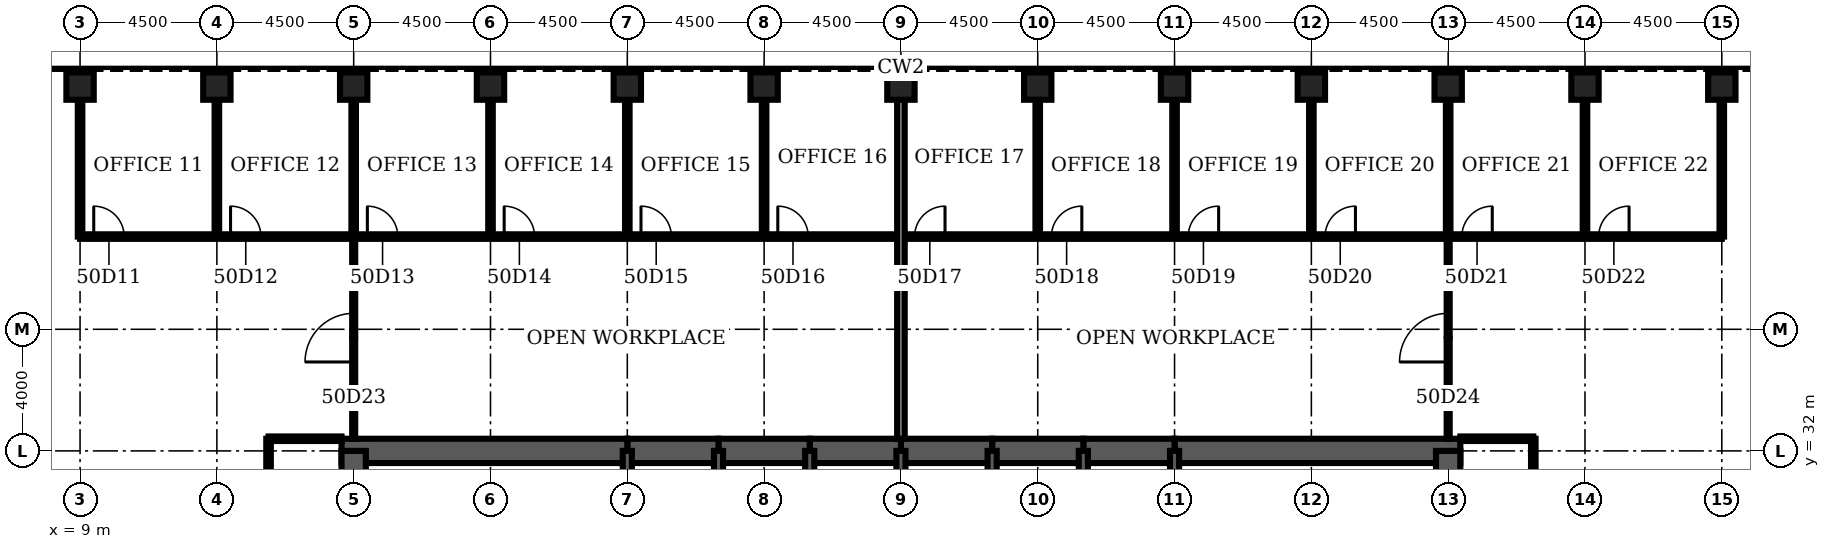
"""IFC4 building model, lengths in metres.
Left out: names, types, materials, properties, quantities, classifications, styles, units other than length and angle.
Written with IfcOpenShell. Run it as: python <this file> out.ifc"""

import sys

from ifc_helpers import new_model, si_unit, direction, frame, frame_2d, origin, origin_2d, place, context, subcontext, project, spatial, rectangle, hollow_rectangle, extrude, element, fill, save


model = new_model("IFC4")
c1 = context("Model", 3, precision=1e-05, world=origin(), true_north=direction((0.0, 1.0)))
c2 = subcontext(c1, "Body", "Model", "MODEL_VIEW")
j1 = project(units=[si_unit("LENGTHUNIT", "METRE"), si_unit("PLANEANGLEUNIT", "RADIAN")], contexts=[c1])
p1 = place(None, origin())
s1 = spatial("IfcSite", under=j1, at=p1, CompositionType="ELEMENT")
p2 = place(p1, origin())
s2 = spatial("IfcBuilding", under=s1, at=p2, CompositionType="ELEMENT")
p3 = place(p2, frame((0.0, 0.0, 223.6)))
s3 = spatial("IfcBuildingStorey", under=s2, at=p3, CompositionType="ELEMENT", Elevation=223.6)
for number, where, z_axis, x_axis in (
    (1, (63.0, 44.0, 0.0), (0.0, 0.0, 1.0), (0.0, 1.0, 0.0)),
    (2, (58.5, 44.0, 0.0), (0.0, 0.0, 1.0), (0.0, 1.0, 0.0)),
    (3, (54.0, 44.0, 0.0), (0.0, 0.0, 1.0), (0.0, 1.0, 0.0)),
    (4, (49.5, 44.0, 0.0), (0.0, 0.0, 1.0), (0.0, 1.0, 0.0)),
    (5, (45.0, 44.0, 0.0), (0.0, 0.0, 1.0), (0.0, 1.0, 0.0)),
    (6, (40.5, 44.0, 0.0), (0.0, 0.0, 1.0), (0.0, 1.0, 0.0)),
    (7, (36.0, 44.0, 0.0), (0.0, 0.0, 1.0), (0.0, 1.0, 0.0)),
    (8, (31.5, 44.0, 0.0), (0.0, 0.0, 1.0), (0.0, 1.0, 0.0)),
    (9, (27.0, 44.0, 0.0), (0.0, 0.0, 1.0), (0.0, 1.0, 0.0)),
    (10, (22.5, 44.0, 0.0), (0.0, 0.0, 1.0), (0.0, 1.0, 0.0)),
    (11, (18.0, 44.0, 0.0), (0.0, 0.0, 1.0), (0.0, 1.0, 0.0)),
    (12, (13.5, 44.0, 0.0), (0.0, 0.0, 1.0), (0.0, 1.0, 0.0)),
    (13, (9.0, 44.0, 0.0), (0.0, 0.0, 1.0), (0.0, 1.0, 0.0)),
):
    element("IfcColumn", number, at=place(p3, frame(where, z_axis=z_axis, x_axis=x_axis)), inside=s3, PredefinedType="COLUMN", context=c2, shape_type="SweptSolid", body=[
        extrude(hollow_rectangle(XDim=0.9, YDim=0.9, WallThickness=0.08, at=origin_2d()), origin(), (0.0, 0.0, 1.0), 4.2),
    ])
p4 = place(p3, frame((54.4, 32.0, 0.0), z_axis=(0.0, 0.0, 1.0), x_axis=(-1.0, 0.0, 0.0)))
e14 = element("IfcWall", 14, at=p4, inside=s3, PredefinedType="SHEAR", context=c2, shape_type="SweptSolid", body=[
    extrude(rectangle(XDim=9.4, YDim=0.8, at=frame_2d((4.7, 0.0))), origin(), (0.0, 0.0, 1.0), 4.2),
])
for number, where, z_axis, x_axis in (
    (15, (45.0, 32.0, 0.0), (0.0, 0.0, 1.0), (-1.0, 0.0, 0.0)),
    (16, (42.0, 32.0, 0.0), (0.0, 0.0, 1.0), (-1.0, 0.0, 0.0)),
    (17, (39.0, 32.0, 0.0), (0.0, 0.0, 1.0), (-1.0, 0.0, 0.0)),
    (18, (36.0, 32.0, 0.0), (0.0, 0.0, 1.0), (-1.0, 0.0, 0.0)),
    (19, (33.0, 32.0, 0.0), (0.0, 0.0, 1.0), (-1.0, 0.0, 0.0)),
    (20, (30.0, 32.0, 0.0), (0.0, 0.0, 1.0), (-1.0, 0.0, 0.0)),
):
    element("IfcWall", number, at=place(p3, frame(where, z_axis=z_axis, x_axis=x_axis)), inside=s3, PredefinedType="SHEAR", context=c2, shape_type="SweptSolid", body=[
        extrude(rectangle(XDim=3.0, YDim=0.8, at=frame_2d((1.5, 0.0))), origin(), (0.0, 0.0, 1.0), 4.2),
    ])
p5 = place(p3, frame((27.0, 32.0, 0.0), z_axis=(0.0, 0.0, 1.0), x_axis=(-1.0, 0.0, 0.0)))
e21 = element("IfcWall", 21, at=p5, inside=s3, PredefinedType="SHEAR", context=c2, shape_type="SweptSolid", body=[
    extrude(rectangle(XDim=9.4, YDim=0.8, at=frame_2d((4.7, 0.0))), origin(), (0.0, 0.0, 1.0), 4.2),
])
for number, where, z_axis, x_axis in (
    (22, (18.0, 32.0, 0.0), (0.0, 0.0, 1.0), (0.0, -1.0, 0.0)),
    (23, (54.0, 28.8, 0.0), (0.0, 0.0, 1.0), (0.0, 1.0, 0.0)),
):
    element("IfcWall", number, at=place(p3, frame(where, z_axis=z_axis, x_axis=x_axis)), inside=s3, PredefinedType="SHEAR", context=c2, shape_type="SweptSolid", body=[
        extrude(rectangle(XDim=3.2, YDim=0.8, at=frame_2d((1.6, 0.0))), origin(), (0.0, 0.0, 1.0), 4.2),
    ])
for number, where, z_axis, x_axis in (
    (24, (27.0, 28.8, 0.0), (0.0, 0.0, 1.0), (0.0, 1.0, 0.0)),
    (25, (30.0, 28.8, 0.0), (0.0, 0.0, 1.0), (0.0, 1.0, 0.0)),
    (26, (33.0, 28.8, 0.0), (0.0, 0.0, 1.0), (0.0, 1.0, 0.0)),
    (27, (36.0, 28.8, 0.0), (0.0, 0.0, 1.0), (0.0, 1.0, 0.0)),
    (28, (39.0, 28.8, 0.0), (0.0, 0.0, 1.0), (0.0, 1.0, 0.0)),
    (29, (42.0, 28.8, 0.0), (0.0, 0.0, 1.0), (0.0, 1.0, 0.0)),
    (30, (45.0, 28.8, 0.0), (0.0, 0.0, 1.0), (0.0, 1.0, 0.0)),
):
    element("IfcWall", number, at=place(p3, frame(where, z_axis=z_axis, x_axis=x_axis)), inside=s3, PredefinedType="SOLIDWALL", context=c2, shape_type="SweptSolid", body=[
        extrude(rectangle(XDim=3.2, YDim=0.3, at=frame_2d((1.6, 0.0))), origin(), (0.0, 0.0, 1.0), 4.2),
    ])
for number, where, z_axis, x_axis in (
    (31, (15.2, 32.4, 0.0), (0.0, 0.0, 1.0), (1.0, 0.0, 0.0)),
    (32, (54.4, 32.4, 0.0), (0.0, 0.0, 1.0), (1.0, 0.0, 0.0)),
):
    element("IfcWall", number, at=place(p3, frame(where, z_axis=z_axis, x_axis=x_axis)), inside=s3, PredefinedType="PARTITIONING", context=c2, shape_type="SweptSolid", body=[
        extrude(rectangle(XDim=2.4, YDim=0.15, at=frame_2d((1.2, 0.0))), origin(), (0.0, 0.0, 1.0), 3.0),
    ])
p6 = place(p3, frame((9.0, 39.05, 0.0), z_axis=(0.0, 0.0, 1.0), x_axis=(1.0, 0.0, 0.0)))
e33 = element("IfcWall", 33, at=p6, inside=s3, PredefinedType="PARTITIONING", context=c2, shape_type="SweptSolid", body=[
    extrude(rectangle(XDim=54.0, YDim=0.15, at=frame_2d((27.0, 0.0))), origin(), (0.0, 0.0, 1.0), 3.0),
])
p7 = place(p6, frame((0.45, 0.0, 0.0)))
e34 = element("IfcOpeningElement", 34, at=p7, cuts=e33, PredefinedType="OPENING", context=c2, shape_type="SweptSolid", body=[
    extrude(rectangle(XDim=1.0, YDim=2.1, at=frame_2d((0.5, 1.05))), frame((0.0, 0.085, 0.0), z_axis=(0.0, -1.0, 0.0), x_axis=(1.0, 0.0, 0.0)), (0.0, 0.0, 1.0), 0.17),
])
p8 = place(p6, frame((4.95, 0.0, 0.0)))
e35 = element("IfcOpeningElement", 35, at=p8, cuts=e33, PredefinedType="OPENING", context=c2, shape_type="SweptSolid", body=[
    extrude(rectangle(XDim=1.0, YDim=2.1, at=frame_2d((0.5, 1.05))), frame((0.0, 0.085, 0.0), z_axis=(0.0, -1.0, 0.0), x_axis=(1.0, 0.0, 0.0)), (0.0, 0.0, 1.0), 0.17),
])
p9 = place(p6, frame((9.45, 0.0, 0.0)))
e36 = element("IfcOpeningElement", 36, at=p9, cuts=e33, PredefinedType="OPENING", context=c2, shape_type="SweptSolid", body=[
    extrude(rectangle(XDim=1.0, YDim=2.1, at=frame_2d((0.5, 1.05))), frame((0.0, 0.085, 0.0), z_axis=(0.0, -1.0, 0.0), x_axis=(1.0, 0.0, 0.0)), (0.0, 0.0, 1.0), 0.17),
])
p10 = place(p6, frame((13.95, 0.0, 0.0)))
e37 = element("IfcOpeningElement", 37, at=p10, cuts=e33, PredefinedType="OPENING", context=c2, shape_type="SweptSolid", body=[
    extrude(rectangle(XDim=1.0, YDim=2.1, at=frame_2d((0.5, 1.05))), frame((0.0, 0.085, 0.0), z_axis=(0.0, -1.0, 0.0), x_axis=(1.0, 0.0, 0.0)), (0.0, 0.0, 1.0), 0.17),
])
p11 = place(p6, frame((18.45, 0.0, 0.0)))
e38 = element("IfcOpeningElement", 38, at=p11, cuts=e33, PredefinedType="OPENING", context=c2, shape_type="SweptSolid", body=[
    extrude(rectangle(XDim=1.0, YDim=2.1, at=frame_2d((0.5, 1.05))), frame((0.0, 0.085, 0.0), z_axis=(0.0, -1.0, 0.0), x_axis=(1.0, 0.0, 0.0)), (0.0, 0.0, 1.0), 0.17),
])
p12 = place(p6, frame((22.95, 0.0, 0.0)))
e39 = element("IfcOpeningElement", 39, at=p12, cuts=e33, PredefinedType="OPENING", context=c2, shape_type="SweptSolid", body=[
    extrude(rectangle(XDim=1.0, YDim=2.1, at=frame_2d((0.5, 1.05))), frame((0.0, 0.085, 0.0), z_axis=(0.0, -1.0, 0.0), x_axis=(1.0, 0.0, 0.0)), (0.0, 0.0, 1.0), 0.17),
])
p13 = place(p6, frame((27.45, 0.0, 0.0)))
e40 = element("IfcOpeningElement", 40, at=p13, cuts=e33, PredefinedType="OPENING", context=c2, shape_type="SweptSolid", body=[
    extrude(rectangle(XDim=1.0, YDim=2.1, at=frame_2d((0.5, 1.05))), frame((0.0, 0.085, 0.0), z_axis=(0.0, -1.0, 0.0), x_axis=(1.0, 0.0, 0.0)), (0.0, 0.0, 1.0), 0.17),
])
p14 = place(p6, frame((31.95, 0.0, 0.0)))
e41 = element("IfcOpeningElement", 41, at=p14, cuts=e33, PredefinedType="OPENING", context=c2, shape_type="SweptSolid", body=[
    extrude(rectangle(XDim=1.0, YDim=2.1, at=frame_2d((0.5, 1.05))), frame((0.0, 0.085, 0.0), z_axis=(0.0, -1.0, 0.0), x_axis=(1.0, 0.0, 0.0)), (0.0, 0.0, 1.0), 0.17),
])
p15 = place(p6, frame((36.45, 0.0, 0.0)))
e42 = element("IfcOpeningElement", 42, at=p15, cuts=e33, PredefinedType="OPENING", context=c2, shape_type="SweptSolid", body=[
    extrude(rectangle(XDim=1.0, YDim=2.1, at=frame_2d((0.5, 1.05))), frame((0.0, 0.085, 0.0), z_axis=(0.0, -1.0, 0.0), x_axis=(1.0, 0.0, 0.0)), (0.0, 0.0, 1.0), 0.17),
])
p16 = place(p6, frame((40.95, 0.0, 0.0)))
e43 = element("IfcOpeningElement", 43, at=p16, cuts=e33, PredefinedType="OPENING", context=c2, shape_type="SweptSolid", body=[
    extrude(rectangle(XDim=1.0, YDim=2.1, at=frame_2d((0.5, 1.05))), frame((0.0, 0.085, 0.0), z_axis=(0.0, -1.0, 0.0), x_axis=(1.0, 0.0, 0.0)), (0.0, 0.0, 1.0), 0.17),
])
p17 = place(p6, frame((45.45, 0.0, 0.0)))
e44 = element("IfcOpeningElement", 44, at=p17, cuts=e33, PredefinedType="OPENING", context=c2, shape_type="SweptSolid", body=[
    extrude(rectangle(XDim=1.0, YDim=2.1, at=frame_2d((0.5, 1.05))), frame((0.0, 0.085, 0.0), z_axis=(0.0, -1.0, 0.0), x_axis=(1.0, 0.0, 0.0)), (0.0, 0.0, 1.0), 0.17),
])
p18 = place(p6, frame((49.95, 0.0, 0.0)))
e45 = element("IfcOpeningElement", 45, at=p18, cuts=e33, PredefinedType="OPENING", context=c2, shape_type="SweptSolid", body=[
    extrude(rectangle(XDim=1.0, YDim=2.1, at=frame_2d((0.5, 1.05))), frame((0.0, 0.085, 0.0), z_axis=(0.0, -1.0, 0.0), x_axis=(1.0, 0.0, 0.0)), (0.0, 0.0, 1.0), 0.17),
])
for number, where, z_axis, x_axis in (
    (46, (9.0, 39.05, 0.0), (0.0, 0.0, 1.0), (0.0, 1.0, 0.0)),
    (47, (13.5, 39.05, 0.0), (0.0, 0.0, 1.0), (0.0, 1.0, 0.0)),
):
    element("IfcWall", number, at=place(p3, frame(where, z_axis=z_axis, x_axis=x_axis)), inside=s3, PredefinedType="PARTITIONING", context=c2, shape_type="SweptSolid", body=[
        extrude(rectangle(XDim=4.5, YDim=0.15, at=frame_2d((2.25, 0.0))), origin(), (0.0, 0.0, 1.0), 3.0),
    ])
p19 = place(p3, frame((15.2, 13.8, 0.0), z_axis=(0.0, 0.0, 1.0), x_axis=(0.0, 1.0, 0.0)))
e48 = element("IfcWall", 48, at=p19, inside=s3, PredefinedType="PARTITIONING", context=c2, shape_type="SweptSolid", body=[
    extrude(rectangle(XDim=18.6, YDim=0.15, at=frame_2d((9.3, 0.0))), origin(), (0.0, 0.0, 1.0), 3.0),
])
p20 = place(p19, frame((9.6, 0.0, 0.0)))
e49 = element("IfcOpeningElement", 49, at=p20, cuts=e48, PredefinedType="OPENING", context=c2, shape_type="SweptSolid", body=[
    extrude(rectangle(XDim=1.2, YDim=2.1, at=frame_2d((0.6, 1.05))), frame((0.0, 0.085, 0.0), z_axis=(0.0, -1.0, 0.0), x_axis=(1.0, 0.0, 0.0)), (0.0, 0.0, 1.0), 0.17),
])
p21 = place(p3, frame((18.0, 32.4, 0.0), z_axis=(0.0, 0.0, 1.0), x_axis=(0.0, 1.0, 0.0)))
e50 = element("IfcWall", 50, at=p21, inside=s3, PredefinedType="PARTITIONING", context=c2, shape_type="SweptSolid", body=[
    extrude(rectangle(XDim=6.65, YDim=0.1, at=frame_2d((3.325, 0.0))), origin(), (0.0, 0.0, 1.0), 3.0),
])
p22 = place(p21, frame((2.525, 0.0, 0.0)))
e51 = element("IfcOpeningElement", 51, at=p22, cuts=e50, PredefinedType="OPENING", context=c2, shape_type="SweptSolid", body=[
    extrude(rectangle(XDim=1.6, YDim=2.1, at=frame_2d((0.8, 1.05))), frame((0.0, 0.06, 0.0), z_axis=(0.0, -1.0, 0.0), x_axis=(1.0, 0.0, 0.0)), (0.0, 0.0, 1.0), 0.12),
])
for number, where, z_axis, x_axis in (
    (52, (18.0, 39.05, 0.0), (0.0, 0.0, 1.0), (0.0, 1.0, 0.0)),
    (53, (22.5, 39.05, 0.0), (0.0, 0.0, 1.0), (0.0, 1.0, 0.0)),
    (54, (27.0, 39.05, 0.0), (0.0, 0.0, 1.0), (0.0, 1.0, 0.0)),
    (55, (31.5, 39.05, 0.0), (0.0, 0.0, 1.0), (0.0, 1.0, 0.0)),
):
    element("IfcWall", number, at=place(p3, frame(where, z_axis=z_axis, x_axis=x_axis)), inside=s3, PredefinedType="PARTITIONING", context=c2, shape_type="SweptSolid", body=[
        extrude(rectangle(XDim=4.5, YDim=0.15, at=frame_2d((2.25, 0.0))), origin(), (0.0, 0.0, 1.0), 3.0),
    ])
p23 = place(p3, frame((36.0, 32.4, 0.0), z_axis=(0.0, 0.0, 1.0), x_axis=(0.0, 1.0, 0.0)))
e56 = element("IfcWall", 56, at=p23, inside=s3, PredefinedType="PARTITIONING", context=c2, shape_type="SweptSolid", body=[
    extrude(rectangle(XDim=11.15, YDim=0.25, at=frame_2d((5.575, 0.0))), origin(), (0.0, 0.0, 1.0), 3.0),
])
for number, where, z_axis, x_axis in (
    (57, (40.5, 39.05, 0.0), (0.0, 0.0, 1.0), (0.0, 1.0, 0.0)),
    (58, (45.0, 39.05, 0.0), (0.0, 0.0, 1.0), (0.0, 1.0, 0.0)),
    (59, (49.5, 39.05, 0.0), (0.0, 0.0, 1.0), (0.0, 1.0, 0.0)),
):
    element("IfcWall", number, at=place(p3, frame(where, z_axis=z_axis, x_axis=x_axis)), inside=s3, PredefinedType="PARTITIONING", context=c2, shape_type="SweptSolid", body=[
        extrude(rectangle(XDim=4.5, YDim=0.15, at=frame_2d((2.25, 0.0))), origin(), (0.0, 0.0, 1.0), 3.0),
    ])
p24 = place(p3, frame((54.0, 32.4, 0.0), z_axis=(0.0, 0.0, 1.0), x_axis=(0.0, 1.0, 0.0)))
e60 = element("IfcWall", 60, at=p24, inside=s3, PredefinedType="PARTITIONING", context=c2, shape_type="SweptSolid", body=[
    extrude(rectangle(XDim=6.65, YDim=0.1, at=frame_2d((3.325, 0.0))), origin(), (0.0, 0.0, 1.0), 3.0),
])
p25 = place(p24, frame((2.525, 0.0, 0.0)))
e61 = element("IfcOpeningElement", 61, at=p25, cuts=e60, PredefinedType="OPENING", context=c2, shape_type="SweptSolid", body=[
    extrude(rectangle(XDim=1.6, YDim=2.1, at=frame_2d((0.8, 1.05))), frame((0.0, 0.06, 0.0), z_axis=(0.0, -1.0, 0.0), x_axis=(1.0, 0.0, 0.0)), (0.0, 0.0, 1.0), 0.12),
])
p26 = place(p3, frame((54.0, 39.05, 0.0), z_axis=(0.0, 0.0, 1.0), x_axis=(0.0, 1.0, 0.0)))
e62 = element("IfcWall", 62, at=p26, inside=s3, PredefinedType="PARTITIONING", context=c2, shape_type="SweptSolid", body=[
    extrude(rectangle(XDim=4.5, YDim=0.15, at=frame_2d((2.25, 0.0))), origin(), (0.0, 0.0, 1.0), 3.0),
])
p27 = place(p3, frame((56.8, 13.8, 0.0), z_axis=(0.0, 0.0, 1.0), x_axis=(0.0, 1.0, 0.0)))
e63 = element("IfcWall", 63, at=p27, inside=s3, PredefinedType="PARTITIONING", context=c2, shape_type="SweptSolid", body=[
    extrude(rectangle(XDim=18.6, YDim=0.15, at=frame_2d((9.3, 0.0))), origin(), (0.0, 0.0, 1.0), 3.0),
])
p28 = place(p27, frame((9.6, 0.0, 0.0)))
e64 = element("IfcOpeningElement", 64, at=p28, cuts=e63, PredefinedType="OPENING", context=c2, shape_type="SweptSolid", body=[
    extrude(rectangle(XDim=1.2, YDim=2.1, at=frame_2d((0.6, 1.05))), frame((0.0, 0.085, 0.0), z_axis=(0.0, -1.0, 0.0), x_axis=(1.0, 0.0, 0.0)), (0.0, 0.0, 1.0), 0.17),
])
for number, where, z_axis, x_axis in (
    (65, (58.5, 39.05, 0.0), (0.0, 0.0, 1.0), (0.0, 1.0, 0.0)),
    (66, (63.0, 39.05, 0.0), (0.0, 0.0, 1.0), (0.0, 1.0, 0.0)),
):
    element("IfcWall", number, at=place(p3, frame(where, z_axis=z_axis, x_axis=x_axis)), inside=s3, PredefinedType="PARTITIONING", context=c2, shape_type="SweptSolid", body=[
        extrude(rectangle(XDim=4.5, YDim=0.15, at=frame_2d((2.25, 0.0))), origin(), (0.0, 0.0, 1.0), 3.0),
    ])
p29 = place(p7, origin())
e67 = element("IfcDoor", 67, at=p29, inside=s3, OperationType="SINGLE_SWING_LEFT", PredefinedType="DOOR", context=c2, shape_type="SweptSolid", body=[
    extrude(rectangle(XDim=1.0, YDim=2.1, at=frame_2d((0.5, 1.05))), frame((0.0, 0.025, 0.0), z_axis=(0.0, -1.0, 0.0), x_axis=(1.0, 0.0, 0.0)), (0.0, 0.0, 1.0), 0.05),
])
fill(e34, e67)
p30 = place(p8, origin())
e68 = element("IfcDoor", 68, at=p30, inside=s3, OperationType="SINGLE_SWING_LEFT", PredefinedType="DOOR", context=c2, shape_type="SweptSolid", body=[
    extrude(rectangle(XDim=1.0, YDim=2.1, at=frame_2d((0.5, 1.05))), frame((0.0, 0.025, 0.0), z_axis=(0.0, -1.0, 0.0), x_axis=(1.0, 0.0, 0.0)), (0.0, 0.0, 1.0), 0.05),
])
fill(e35, e68)
p31 = place(p9, origin())
e69 = element("IfcDoor", 69, at=p31, inside=s3, OperationType="SINGLE_SWING_LEFT", PredefinedType="DOOR", context=c2, shape_type="SweptSolid", body=[
    extrude(rectangle(XDim=1.0, YDim=2.1, at=frame_2d((0.5, 1.05))), frame((0.0, 0.025, 0.0), z_axis=(0.0, -1.0, 0.0), x_axis=(1.0, 0.0, 0.0)), (0.0, 0.0, 1.0), 0.05),
])
fill(e36, e69)
p32 = place(p10, origin())
e70 = element("IfcDoor", 70, at=p32, inside=s3, OperationType="SINGLE_SWING_LEFT", PredefinedType="DOOR", context=c2, shape_type="SweptSolid", body=[
    extrude(rectangle(XDim=1.0, YDim=2.1, at=frame_2d((0.5, 1.05))), frame((0.0, 0.025, 0.0), z_axis=(0.0, -1.0, 0.0), x_axis=(1.0, 0.0, 0.0)), (0.0, 0.0, 1.0), 0.05),
])
fill(e37, e70)
p33 = place(p11, origin())
e71 = element("IfcDoor", 71, at=p33, inside=s3, OperationType="SINGLE_SWING_LEFT", PredefinedType="DOOR", context=c2, shape_type="SweptSolid", body=[
    extrude(rectangle(XDim=1.0, YDim=2.1, at=frame_2d((0.5, 1.05))), frame((0.0, 0.025, 0.0), z_axis=(0.0, -1.0, 0.0), x_axis=(1.0, 0.0, 0.0)), (0.0, 0.0, 1.0), 0.05),
])
fill(e38, e71)
p34 = place(p12, origin())
e72 = element("IfcDoor", 72, at=p34, inside=s3, OperationType="SINGLE_SWING_LEFT", PredefinedType="DOOR", context=c2, shape_type="SweptSolid", body=[
    extrude(rectangle(XDim=1.0, YDim=2.1, at=frame_2d((0.5, 1.05))), frame((0.0, 0.025, 0.0), z_axis=(0.0, -1.0, 0.0), x_axis=(1.0, 0.0, 0.0)), (0.0, 0.0, 1.0), 0.05),
])
fill(e39, e72)
p35 = place(p13, origin())
e73 = element("IfcDoor", 73, at=p35, inside=s3, OperationType="SINGLE_SWING_RIGHT", PredefinedType="DOOR", context=c2, shape_type="SweptSolid", body=[
    extrude(rectangle(XDim=1.0, YDim=2.1, at=frame_2d((0.5, 1.05))), frame((0.0, 0.025, 0.0), z_axis=(0.0, -1.0, 0.0), x_axis=(1.0, 0.0, 0.0)), (0.0, 0.0, 1.0), 0.05),
])
fill(e40, e73)
p36 = place(p14, origin())
e74 = element("IfcDoor", 74, at=p36, inside=s3, OperationType="SINGLE_SWING_RIGHT", PredefinedType="DOOR", context=c2, shape_type="SweptSolid", body=[
    extrude(rectangle(XDim=1.0, YDim=2.1, at=frame_2d((0.5, 1.05))), frame((0.0, 0.025, 0.0), z_axis=(0.0, -1.0, 0.0), x_axis=(1.0, 0.0, 0.0)), (0.0, 0.0, 1.0), 0.05),
])
fill(e41, e74)
p37 = place(p15, origin())
e75 = element("IfcDoor", 75, at=p37, inside=s3, OperationType="SINGLE_SWING_RIGHT", PredefinedType="DOOR", context=c2, shape_type="SweptSolid", body=[
    extrude(rectangle(XDim=1.0, YDim=2.1, at=frame_2d((0.5, 1.05))), frame((0.0, 0.025, 0.0), z_axis=(0.0, -1.0, 0.0), x_axis=(1.0, 0.0, 0.0)), (0.0, 0.0, 1.0), 0.05),
])
fill(e42, e75)
p38 = place(p16, origin())
e76 = element("IfcDoor", 76, at=p38, inside=s3, OperationType="SINGLE_SWING_RIGHT", PredefinedType="DOOR", context=c2, shape_type="SweptSolid", body=[
    extrude(rectangle(XDim=1.0, YDim=2.1, at=frame_2d((0.5, 1.05))), frame((0.0, 0.025, 0.0), z_axis=(0.0, -1.0, 0.0), x_axis=(1.0, 0.0, 0.0)), (0.0, 0.0, 1.0), 0.05),
])
fill(e43, e76)
p39 = place(p17, origin())
e77 = element("IfcDoor", 77, at=p39, inside=s3, OperationType="SINGLE_SWING_RIGHT", PredefinedType="DOOR", context=c2, shape_type="SweptSolid", body=[
    extrude(rectangle(XDim=1.0, YDim=2.1, at=frame_2d((0.5, 1.05))), frame((0.0, 0.025, 0.0), z_axis=(0.0, -1.0, 0.0), x_axis=(1.0, 0.0, 0.0)), (0.0, 0.0, 1.0), 0.05),
])
fill(e44, e77)
p40 = place(p18, origin())
e78 = element("IfcDoor", 78, at=p40, inside=s3, OperationType="SINGLE_SWING_RIGHT", PredefinedType="DOOR", context=c2, shape_type="SweptSolid", body=[
    extrude(rectangle(XDim=1.0, YDim=2.1, at=frame_2d((0.5, 1.05))), frame((0.0, 0.025, 0.0), z_axis=(0.0, -1.0, 0.0), x_axis=(1.0, 0.0, 0.0)), (0.0, 0.0, 1.0), 0.05),
])
fill(e45, e78)
p41 = place(p22, origin())
e79 = element("IfcDoor", 79, at=p41, inside=s3, OperationType="SINGLE_SWING_LEFT", PredefinedType="DOOR", context=c2, shape_type="SweptSolid", body=[
    extrude(rectangle(XDim=1.6, YDim=2.1, at=frame_2d((0.8, 1.05))), frame((0.0, 0.025, 0.0), z_axis=(0.0, -1.0, 0.0), x_axis=(1.0, 0.0, 0.0)), (0.0, 0.0, 1.0), 0.05),
])
fill(e51, e79)
p42 = place(p25, origin())
e80 = element("IfcDoor", 80, at=p42, inside=s3, OperationType="SINGLE_SWING_LEFT", PredefinedType="DOOR", context=c2, shape_type="SweptSolid", body=[
    extrude(rectangle(XDim=1.6, YDim=2.1, at=frame_2d((0.8, 1.05))), frame((0.0, 0.025, 0.0), z_axis=(0.0, -1.0, 0.0), x_axis=(1.0, 0.0, 0.0)), (0.0, 0.0, 1.0), 0.05),
])
fill(e61, e80)
save(model, sys.argv[1])
